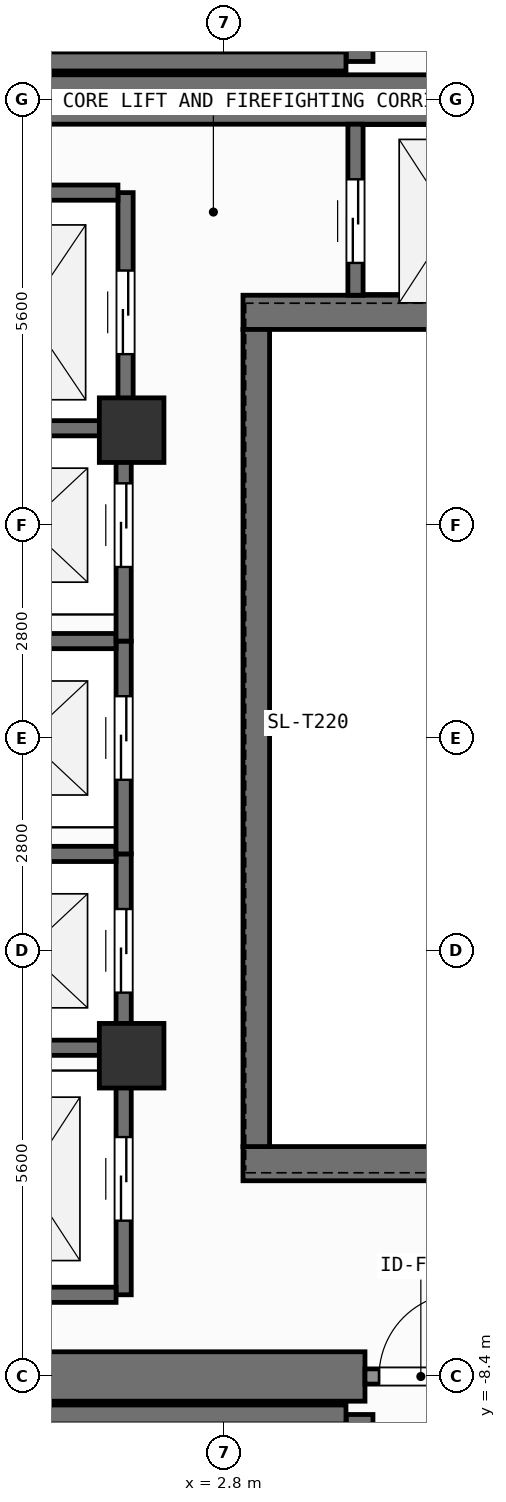
"""IFC4 building model, lengths in metres.
Left out: names, types, materials, properties, quantities, classifications, styles, units other than length and angle.
Written with IfcOpenShell. Run it as: python <this file> out.ifc"""

import sys

from ifc_helpers import new_model, si_unit, direction, frame, frame_2d, origin, origin_2d, place, context, subcontext, project, spatial, rectangle, extrude, element, fill, save


model = new_model("IFC4")
c1 = context("Model", 3, precision=1e-05, world=origin(), true_north=direction((0.0, 1.0)))
c2 = subcontext(c1, "Body", "Model", "MODEL_VIEW")
j1 = project(units=[si_unit("LENGTHUNIT", "METRE"), si_unit("PLANEANGLEUNIT", "RADIAN")], contexts=[c1])
p1 = place(None, origin())
s1 = spatial("IfcSite", under=j1, at=p1, CompositionType="ELEMENT")
p2 = place(p1, origin())
s2 = spatial("IfcBuilding", under=s1, at=p2, CompositionType="ELEMENT")
p3 = place(p2, frame((0.0, 0.0, 278.1)))
s3 = spatial("IfcBuildingStorey", under=s2, at=p3, CompositionType="ELEMENT", Elevation=278.1)
p4 = place(p3, frame((-2.62, -8.4, 0.0), z_axis=(0.0, 0.0, 1.0), x_axis=(1.0, 0.0, 0.0)))
e1 = element("IfcWall", 1, at=p4, inside=s3, PredefinedType="SHEAR", context=c2, shape_type="SweptSolid", body=[
    extrude(rectangle(XDim=7.27, YDim=0.65, at=frame_2d((3.635, 0.0))), origin(), (0.0, 0.0, 1.0), 3.9),
])
p5 = place(p3, frame((-7.55, 8.4, 0.0), z_axis=(0.0, 0.0, 1.0), x_axis=(1.0, 0.0, 0.0)))
e2 = element("IfcWall", 2, at=p5, inside=s3, PredefinedType="SHEAR", context=c2, shape_type="SweptSolid", body=[
    extrude(rectangle(XDim=16.275, YDim=0.65, at=frame_2d((8.138, 0.0))), origin(), (0.0, 0.0, 1.0), 3.9),
])
for number, where, z_axis, x_axis in (
    (3, (3.045, -5.6, 0.0), (0.0, 0.0, 1.0), (1.0, 0.0, 0.0)),
    (4, (3.045, 5.6, 0.0), (0.0, 0.0, 1.0), (1.0, 0.0, 0.0)),
):
    element("IfcWall", number, at=place(p3, frame(where, z_axis=z_axis, x_axis=x_axis)), inside=s3, PredefinedType="SHEAR", context=c2, shape_type="SweptSolid", body=[
        extrude(rectangle(XDim=5.68, YDim=0.45, at=frame_2d((2.84, 0.0))), origin(), (0.0, 0.0, 1.0), 3.9),
    ])
p6 = place(p3, frame((3.22, -5.375, 0.0), z_axis=(0.0, 0.0, 1.0), x_axis=(0.0, 1.0, 0.0)))
e5 = element("IfcWall", 5, at=p6, inside=s3, PredefinedType="SHEAR", context=c2, shape_type="SweptSolid", body=[
    extrude(rectangle(XDim=10.75, YDim=0.35, at=frame_2d((5.375, 0.0))), origin(), (0.0, 0.0, 1.0), 3.9),
])
p7 = place(p3, frame((-2.2, -8.9, 0.0), z_axis=(0.0, 0.0, 1.0), x_axis=(1.0, 0.0, 0.0)))
e6 = element("IfcWall", 6, at=p7, inside=s3, PredefinedType="SHEAR", context=c2, shape_type="SweptSolid", body=[
    extrude(rectangle(XDim=6.6, YDim=0.25, at=frame_2d((3.3, 0.0))), origin(), (0.0, 0.0, 1.0), 3.9),
])
p8 = place(p3, frame((4.58, -8.9, 0.0), z_axis=(0.0, 0.0, 1.0), x_axis=(0.0, -1.0, 0.0)))
e7 = element("IfcWall", 7, at=p8, inside=s3, PredefinedType="SHEAR", context=c2, shape_type="SweptSolid", body=[
    extrude(rectangle(XDim=2.925, YDim=0.35, at=frame_2d((1.462, 0.0))), origin(), (0.0, 0.0, 1.0), 3.9),
])
p9 = place(p8, frame((0.913, 0.0, 0.0)))
e8 = element("IfcOpeningElement", 8, at=p9, cuts=e7, PredefinedType="OPENING", context=c2, shape_type="SweptSolid", body=[
    extrude(rectangle(XDim=1.1, YDim=2.15, at=frame_2d((0.55, 1.075))), frame((0.0, 0.185, 0.0), z_axis=(0.0, -1.0, 0.0), x_axis=(1.0, 0.0, 0.0)), (0.0, 0.0, 1.0), 0.37),
])
p10 = place(p3, frame((-2.2, 8.9, 0.0), z_axis=(0.0, 0.0, 1.0), x_axis=(1.0, 0.0, 0.0)))
e9 = element("IfcWall", 9, at=p10, inside=s3, PredefinedType="SHEAR", context=c2, shape_type="SweptSolid", body=[
    extrude(rectangle(XDim=6.6, YDim=0.25, at=frame_2d((3.3, 0.0))), origin(), (0.0, 0.0, 1.0), 3.9),
])
p11 = place(p3, frame((4.58, 11.825, 0.0), z_axis=(0.0, 0.0, 1.0), x_axis=(0.0, -1.0, 0.0)))
e10 = element("IfcWall", 10, at=p11, inside=s3, PredefinedType="SHEAR", context=c2, shape_type="SweptSolid", body=[
    extrude(rectangle(XDim=2.925, YDim=0.35, at=frame_2d((1.462, 0.0))), origin(), (0.0, 0.0, 1.0), 3.9),
])
p12 = place(p11, frame((0.913, 0.0, 0.0)))
e11 = element("IfcOpeningElement", 11, at=p12, cuts=e10, PredefinedType="OPENING", context=c2, shape_type="SweptSolid", body=[
    extrude(rectangle(XDim=1.1, YDim=2.15, at=frame_2d((0.55, 1.075))), frame((0.0, 0.185, 0.0), z_axis=(0.0, -1.0, 0.0), x_axis=(1.0, 0.0, 0.0)), (0.0, 0.0, 1.0), 0.37),
])
for number, where, z_axis, x_axis in (
    (12, (1.58, -4.18, 0.0), (0.0, 0.0, 1.0), (1.0, 0.0, 0.0)),
    (13, (1.58, 4.05, 0.0), (0.0, 0.0, 1.0), (1.0, 0.0, 0.0)),
):
    element("IfcColumn", number, at=place(p3, frame(where, z_axis=z_axis, x_axis=x_axis)), inside=s3, PredefinedType="COLUMN", context=c2, shape_type="SweptSolid", body=[
        extrude(rectangle(XDim=0.85, YDim=0.85, at=origin_2d()), origin(), (0.0, 0.0, 1.0), 3.9),
    ])
p13 = place(p3, frame((1.475, -4.275, 0.0), z_axis=(0.0, 0.0, 1.0), x_axis=(0.0, 1.0, 0.0)))
e14 = element("IfcWall", 14, at=p13, inside=s3, PredefinedType="SHEAR", context=c2, shape_type="SweptSolid", body=[
    extrude(rectangle(XDim=2.75, YDim=0.2, at=frame_2d((1.375, 0.0))), origin(), (0.0, 0.0, 1.0), 3.68),
])
p14 = place(p13, frame((0.925, 0.0, 0.0)))
e15 = element("IfcOpeningElement", 15, at=p14, cuts=e14, PredefinedType="OPENING", context=c2, shape_type="SweptSolid", body=[
    extrude(rectangle(XDim=1.1, YDim=2.2, at=frame_2d((0.55, 1.1))), frame((0.0, 0.11, 0.0), z_axis=(0.0, -1.0, 0.0), x_axis=(1.0, 0.0, 0.0)), (0.0, 0.0, 1.0), 0.22),
])
for number, where, z_axis, x_axis in (
    (16, (-0.975, -4.075, 0.0), (0.0, 0.0, 1.0), (1.0, 0.0, 0.0)),
    (17, (-0.975, -1.525, 0.0), (0.0, 0.0, 1.0), (1.0, 0.0, 0.0)),
):
    element("IfcWall", number, at=place(p3, frame(where, z_axis=z_axis, x_axis=x_axis)), inside=s3, PredefinedType="SHEAR", context=c2, shape_type="SweptSolid", body=[
        extrude(rectangle(XDim=2.35, YDim=0.2, at=frame_2d((1.175, 0.0))), origin(), (0.0, 0.0, 1.0), 3.68),
    ])
p15 = place(p3, frame((1.475, -1.525, 0.0), z_axis=(0.0, 0.0, 1.0), x_axis=(0.0, 1.0, 0.0)))
e18 = element("IfcWall", 18, at=p15, inside=s3, PredefinedType="SHEAR", context=c2, shape_type="SweptSolid", body=[
    extrude(rectangle(XDim=2.8, YDim=0.2, at=frame_2d((1.4, 0.0))), origin(), (0.0, 0.0, 1.0), 3.68),
])
p16 = place(p15, frame((0.975, 0.0, 0.0)))
e19 = element("IfcOpeningElement", 19, at=p16, cuts=e18, PredefinedType="OPENING", context=c2, shape_type="SweptSolid", body=[
    extrude(rectangle(XDim=1.1, YDim=2.2, at=frame_2d((0.55, 1.1))), frame((0.0, 0.11, 0.0), z_axis=(0.0, -1.0, 0.0), x_axis=(1.0, 0.0, 0.0)), (0.0, 0.0, 1.0), 0.22),
])
p17 = place(p3, frame((-0.975, 1.275, 0.0), z_axis=(0.0, 0.0, 1.0), x_axis=(1.0, 0.0, 0.0)))
e20 = element("IfcWall", 20, at=p17, inside=s3, PredefinedType="SHEAR", context=c2, shape_type="SweptSolid", body=[
    extrude(rectangle(XDim=2.35, YDim=0.2, at=frame_2d((1.175, 0.0))), origin(), (0.0, 0.0, 1.0), 3.68),
])
p18 = place(p3, frame((1.475, 1.275, 0.0), z_axis=(0.0, 0.0, 1.0), x_axis=(0.0, 1.0, 0.0)))
e21 = element("IfcWall", 21, at=p18, inside=s3, PredefinedType="SHEAR", context=c2, shape_type="SweptSolid", body=[
    extrude(rectangle(XDim=2.8, YDim=0.2, at=frame_2d((1.4, 0.0))), origin(), (0.0, 0.0, 1.0), 3.68),
])
p19 = place(p18, frame((0.975, 0.0, 0.0)))
e22 = element("IfcOpeningElement", 22, at=p19, cuts=e21, PredefinedType="OPENING", context=c2, shape_type="SweptSolid", body=[
    extrude(rectangle(XDim=1.1, YDim=2.2, at=frame_2d((0.55, 1.1))), frame((0.0, 0.11, 0.0), z_axis=(0.0, -1.0, 0.0), x_axis=(1.0, 0.0, 0.0)), (0.0, 0.0, 1.0), 0.22),
])
p20 = place(p3, frame((-0.975, 4.075, 0.0), z_axis=(0.0, 0.0, 1.0), x_axis=(1.0, 0.0, 0.0)))
e23 = element("IfcWall", 23, at=p20, inside=s3, PredefinedType="SHEAR", context=c2, shape_type="SweptSolid", body=[
    extrude(rectangle(XDim=2.35, YDim=0.2, at=frame_2d((1.175, 0.0))), origin(), (0.0, 0.0, 1.0), 3.68),
])
p21 = place(p3, frame((1.5, 4.025, 0.0), z_axis=(0.0, 0.0, 1.0), x_axis=(0.0, 1.0, 0.0)))
e24 = element("IfcWall", 24, at=p21, inside=s3, PredefinedType="SHEAR", context=c2, shape_type="SweptSolid", body=[
    extrude(rectangle(XDim=3.15, YDim=0.2, at=frame_2d((1.575, 0.0))), origin(), (0.0, 0.0, 1.0), 3.68),
])
p22 = place(p21, frame((1.025, 0.0, 0.0)))
e25 = element("IfcOpeningElement", 25, at=p22, cuts=e24, PredefinedType="OPENING", context=c2, shape_type="SweptSolid", body=[
    extrude(rectangle(XDim=1.1, YDim=2.2, at=frame_2d((0.55, 1.1))), frame((0.0, 0.11, 0.0), z_axis=(0.0, -1.0, 0.0), x_axis=(1.0, 0.0, 0.0)), (0.0, 0.0, 1.0), 0.22),
])
p23 = place(p3, frame((-1.0, 7.175, 0.0), z_axis=(0.0, 0.0, 1.0), x_axis=(1.0, 0.0, 0.0)))
e26 = element("IfcWall", 26, at=p23, inside=s3, PredefinedType="SHEAR", context=c2, shape_type="SweptSolid", body=[
    extrude(rectangle(XDim=2.4, YDim=0.2, at=frame_2d((1.2, 0.0))), origin(), (0.0, 0.0, 1.0), 3.68),
])
p24 = place(p3, frame((1.475, -7.325, 0.0), z_axis=(0.0, 0.0, 1.0), x_axis=(0.0, 1.0, 0.0)))
e27 = element("IfcWall", 27, at=p24, inside=s3, PredefinedType="SHEAR", context=c2, shape_type="SweptSolid", body=[
    extrude(rectangle(XDim=3.05, YDim=0.2, at=frame_2d((1.525, 0.0))), origin(), (0.0, 0.0, 1.0), 3.68),
])
p25 = place(p24, frame((0.975, 0.0, 0.0)))
e28 = element("IfcOpeningElement", 28, at=p25, cuts=e27, PredefinedType="OPENING", context=c2, shape_type="SweptSolid", body=[
    extrude(rectangle(XDim=1.1, YDim=2.2, at=frame_2d((0.55, 1.1))), frame((0.0, 0.11, 0.0), z_axis=(0.0, -1.0, 0.0), x_axis=(1.0, 0.0, 0.0)), (0.0, 0.0, 1.0), 0.22),
])
p26 = place(p3, frame((-0.975, -7.325, 0.0), z_axis=(0.0, 0.0, 1.0), x_axis=(1.0, 0.0, 0.0)))
e29 = element("IfcWall", 29, at=p26, inside=s3, PredefinedType="SHEAR", context=c2, shape_type="SweptSolid", body=[
    extrude(rectangle(XDim=2.35, YDim=0.2, at=frame_2d((1.175, 0.0))), origin(), (0.0, 0.0, 1.0), 3.68),
])
p27 = place(p3, frame((4.525, 5.825, 0.0), z_axis=(0.0, 0.0, 1.0), x_axis=(0.0, 1.0, 0.0)))
e30 = element("IfcWall", 30, at=p27, inside=s3, PredefinedType="SHEAR", context=c2, shape_type="SweptSolid", body=[
    extrude(rectangle(XDim=2.25, YDim=0.2, at=frame_2d((1.125, 0.0))), origin(), (0.0, 0.0, 1.0), 3.68),
])
p28 = place(p27, frame((0.425, 0.0, 0.0)))
e31 = element("IfcOpeningElement", 31, at=p28, cuts=e30, PredefinedType="OPENING", context=c2, shape_type="SweptSolid", body=[
    extrude(rectangle(XDim=1.1, YDim=2.2, at=frame_2d((0.55, 1.1))), frame((0.0, 0.11, 0.0), z_axis=(0.0, -1.0, 0.0), x_axis=(1.0, 0.0, 0.0)), (0.0, 0.0, 1.0), 0.22),
])
p29 = place(p3, frame((4.65, -8.4, 0.0), z_axis=(0.0, 0.0, 1.0), x_axis=(1.0, 0.0, 0.0)))
e32 = element("IfcWall", 32, at=p29, inside=s3, PredefinedType="SOLIDWALL", context=c2, shape_type="SweptSolid", body=[
    extrude(rectangle(XDim=1.47, YDim=0.2, at=frame_2d((0.735, 0.0))), origin(), (0.0, 0.0, 1.0), 2.92),
])
p30 = place(p29, frame((0.185, 0.0, 0.0)))
e33 = element("IfcOpeningElement", 33, at=p30, cuts=e32, PredefinedType="OPENING", context=c2, shape_type="SweptSolid", body=[
    extrude(rectangle(XDim=1.1, YDim=2.15, at=frame_2d((0.55, 1.075))), frame((0.0, 0.11, 0.0), z_axis=(0.0, -1.0, 0.0), x_axis=(1.0, 0.0, 0.0)), (0.0, 0.0, 1.0), 0.22),
])
p31 = place(p14, origin())
e34 = element("IfcDoor", 34, at=p31, inside=s3, OperationType="SLIDING_TO_LEFT", PredefinedType="DOOR", context=c2, shape_type="SweptSolid", body=[
    extrude(rectangle(XDim=1.1, YDim=2.2, at=frame_2d((0.55, 1.1))), frame((0.0, 0.025, 0.0), z_axis=(0.0, -1.0, 0.0), x_axis=(1.0, 0.0, 0.0)), (0.0, 0.0, 1.0), 0.05),
])
fill(e15, e34)
p32 = place(p16, origin())
e35 = element("IfcDoor", 35, at=p32, inside=s3, OperationType="SLIDING_TO_LEFT", PredefinedType="DOOR", context=c2, shape_type="SweptSolid", body=[
    extrude(rectangle(XDim=1.1, YDim=2.2, at=frame_2d((0.55, 1.1))), frame((0.0, 0.025, 0.0), z_axis=(0.0, -1.0, 0.0), x_axis=(1.0, 0.0, 0.0)), (0.0, 0.0, 1.0), 0.05),
])
fill(e19, e35)
p33 = place(p19, origin())
e36 = element("IfcDoor", 36, at=p33, inside=s3, OperationType="SLIDING_TO_LEFT", PredefinedType="DOOR", context=c2, shape_type="SweptSolid", body=[
    extrude(rectangle(XDim=1.1, YDim=2.2, at=frame_2d((0.55, 1.1))), frame((0.0, 0.025, 0.0), z_axis=(0.0, -1.0, 0.0), x_axis=(1.0, 0.0, 0.0)), (0.0, 0.0, 1.0), 0.05),
])
fill(e22, e36)
p34 = place(p22, origin())
e37 = element("IfcDoor", 37, at=p34, inside=s3, OperationType="SLIDING_TO_LEFT", PredefinedType="DOOR", context=c2, shape_type="SweptSolid", body=[
    extrude(rectangle(XDim=1.1, YDim=2.2, at=frame_2d((0.55, 1.1))), frame((0.0, 0.025, 0.0), z_axis=(0.0, -1.0, 0.0), x_axis=(1.0, 0.0, 0.0)), (0.0, 0.0, 1.0), 0.05),
])
fill(e25, e37)
p35 = place(p25, origin())
e38 = element("IfcDoor", 38, at=p35, inside=s3, OperationType="SLIDING_TO_LEFT", PredefinedType="DOOR", context=c2, shape_type="SweptSolid", body=[
    extrude(rectangle(XDim=1.1, YDim=2.2, at=frame_2d((0.55, 1.1))), frame((0.0, 0.025, 0.0), z_axis=(0.0, -1.0, 0.0), x_axis=(1.0, 0.0, 0.0)), (0.0, 0.0, 1.0), 0.05),
])
fill(e28, e38)
p36 = place(p28, origin())
e39 = element("IfcDoor", 39, at=p36, inside=s3, OperationType="SLIDING_TO_LEFT", PredefinedType="DOOR", context=c2, shape_type="SweptSolid", body=[
    extrude(rectangle(XDim=1.1, YDim=2.2, at=frame_2d((0.55, 1.1))), frame((0.0, 0.025, 0.0), z_axis=(0.0, -1.0, 0.0), x_axis=(1.0, 0.0, 0.0)), (0.0, 0.0, 1.0), 0.05),
])
fill(e31, e39)
p37 = place(p30, origin())
e40 = element("IfcDoor", 40, at=p37, inside=s3, OperationType="SINGLE_SWING_RIGHT", PredefinedType="DOOR", context=c2, shape_type="SweptSolid", body=[
    extrude(rectangle(XDim=1.1, YDim=2.15, at=frame_2d((0.55, 1.075))), frame((0.0, 0.025, 0.0), z_axis=(0.0, -1.0, 0.0), x_axis=(1.0, 0.0, 0.0)), (0.0, 0.0, 1.0), 0.05),
])
fill(e33, e40)
save(model, sys.argv[1])
